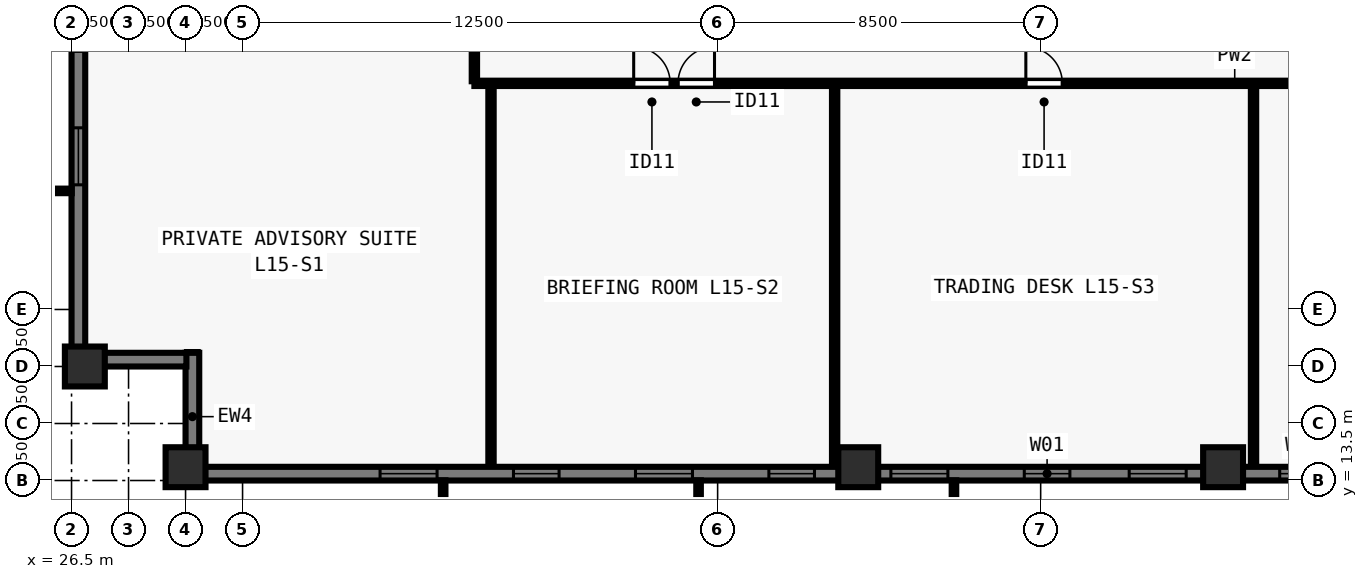
"""IFC4 building model, lengths in metres.
Left out: names, types, materials, properties, quantities, classifications, styles, units other than length and angle.
Written with IfcOpenShell. Run it as: python <this file> out.ifc"""

import sys

from ifc_helpers import new_model, si_unit, direction, frame, frame_2d, origin, origin_2d, place, context, subcontext, project, spatial, rectangle, extrude, element, fill, save


model = new_model("IFC4")
c1 = context("Model", 3, precision=1e-05, world=origin(), true_north=direction((0.0, 1.0)))
c2 = subcontext(c1, "Body", "Model", "MODEL_VIEW")
j1 = project(units=[si_unit("LENGTHUNIT", "METRE"), si_unit("PLANEANGLEUNIT", "RADIAN")], contexts=[c1])
p1 = place(None, origin())
s1 = spatial("IfcSite", under=j1, at=p1, CompositionType="ELEMENT")
p2 = place(p1, origin())
s2 = spatial("IfcBuilding", under=s1, at=p2, CompositionType="ELEMENT")
p3 = place(p2, frame((0.0, 0.0, 58.5)))
s3 = spatial("IfcBuildingStorey", under=s2, at=p3, CompositionType="ELEMENT", Elevation=58.5)
for number, where, z_axis, x_axis in (
    (1, (29.5, 13.85, 0.0), (0.0, 0.0, 1.0), (1.0, 0.0, 0.0)),
    (2, (47.2, 13.85, 0.0), (0.0, 0.0, 1.0), (1.0, 0.0, 0.0)),
    (3, (56.8, 13.85, 0.0), (0.0, 0.0, 1.0), (1.0, 0.0, 0.0)),
    (4, (26.85, 16.5, 0.0), (0.0, 0.0, 1.0), (0.0, 1.0, 0.0)),
):
    element("IfcColumn", number, at=place(p3, frame(where, z_axis=z_axis, x_axis=x_axis)), inside=s3, PredefinedType="COLUMN", context=c2, shape_type="SweptSolid", body=[
        extrude(rectangle(XDim=1.05, YDim=1.05, at=origin_2d()), origin(), (0.0, 0.0, 1.0), 3.5),
    ])
p4 = place(p3, frame((74.5, 13.68, 0.0), z_axis=(0.0, 0.0, 1.0), x_axis=(-1.0, 0.0, 0.0)))
e5 = element("IfcWall", 5, at=p4, inside=s3, PredefinedType="SOLIDWALL", context=c2, shape_type="SweptSolid", body=[
    extrude(rectangle(XDim=44.662, YDim=0.36, at=frame_2d((22.331, 0.0))), origin(), (0.0, 0.0, 1.0), 3.28),
])
p5 = place(p4, frame((4.78, 0.0, 0.8)))
e6 = element("IfcOpeningElement", 6, at=p5, cuts=e5, PredefinedType="OPENING", context=c2, shape_type="SweptSolid", body=[
    extrude(rectangle(XDim=1.5, YDim=1.544, at=frame_2d((0.75, 0.772))), frame((0.0, 0.19, 0.0), z_axis=(0.0, -1.0, 0.0), x_axis=(1.0, 0.0, 0.0)), (0.0, 0.0, 1.0), 0.38),
])
p6 = place(p4, frame((8.29, 0.0, 0.8)))
e7 = element("IfcOpeningElement", 7, at=p6, cuts=e5, PredefinedType="OPENING", context=c2, shape_type="SweptSolid", body=[
    extrude(rectangle(XDim=1.2, YDim=1.544, at=frame_2d((0.6, 0.772))), frame((0.0, 0.19, 0.0), z_axis=(0.0, -1.0, 0.0), x_axis=(1.0, 0.0, 0.0)), (0.0, 0.0, 1.0), 0.38),
])
p7 = place(p4, frame((11.5, 0.0, 0.8)))
e8 = element("IfcOpeningElement", 8, at=p7, cuts=e5, PredefinedType="OPENING", context=c2, shape_type="SweptSolid", body=[
    extrude(rectangle(XDim=1.5, YDim=1.544, at=frame_2d((0.75, 0.772))), frame((0.0, 0.19, 0.0), z_axis=(0.0, -1.0, 0.0), x_axis=(1.0, 0.0, 0.0)), (0.0, 0.0, 1.0), 0.38),
])
p8 = place(p4, frame((15.01, 0.0, 0.8)))
e9 = element("IfcOpeningElement", 9, at=p8, cuts=e5, PredefinedType="OPENING", context=c2, shape_type="SweptSolid", body=[
    extrude(rectangle(XDim=1.2, YDim=1.544, at=frame_2d((0.6, 0.772))), frame((0.0, 0.19, 0.0), z_axis=(0.0, -1.0, 0.0), x_axis=(1.0, 0.0, 0.0)), (0.0, 0.0, 1.0), 0.38),
])
p9 = place(p4, frame((18.671, 0.0, 0.8)))
e10 = element("IfcOpeningElement", 10, at=p9, cuts=e5, PredefinedType="OPENING", context=c2, shape_type="SweptSolid", body=[
    extrude(rectangle(XDim=1.5, YDim=1.544, at=frame_2d((0.75, 0.772))), frame((0.0, 0.19, 0.0), z_axis=(0.0, -1.0, 0.0), x_axis=(1.0, 0.0, 0.0)), (0.0, 0.0, 1.0), 0.38),
])
p10 = place(p4, frame((21.731, 0.0, 0.8)))
e11 = element("IfcOpeningElement", 11, at=p10, cuts=e5, PredefinedType="OPENING", context=c2, shape_type="SweptSolid", body=[
    extrude(rectangle(XDim=1.2, YDim=1.544, at=frame_2d((0.6, 0.772))), frame((0.0, 0.19, 0.0), z_axis=(0.0, -1.0, 0.0), x_axis=(1.0, 0.0, 0.0)), (0.0, 0.0, 1.0), 0.38),
])
p11 = place(p4, frame((24.941, 0.0, 0.8)))
e12 = element("IfcOpeningElement", 12, at=p11, cuts=e5, PredefinedType="OPENING", context=c2, shape_type="SweptSolid", body=[
    extrude(rectangle(XDim=1.5, YDim=1.544, at=frame_2d((0.75, 0.772))), frame((0.0, 0.19, 0.0), z_axis=(0.0, -1.0, 0.0), x_axis=(1.0, 0.0, 0.0)), (0.0, 0.0, 1.0), 0.38),
])
p12 = place(p4, frame((28.451, 0.0, 0.8)))
e13 = element("IfcOpeningElement", 13, at=p12, cuts=e5, PredefinedType="OPENING", context=c2, shape_type="SweptSolid", body=[
    extrude(rectangle(XDim=1.2, YDim=1.544, at=frame_2d((0.6, 0.772))), frame((0.0, 0.19, 0.0), z_axis=(0.0, -1.0, 0.0), x_axis=(1.0, 0.0, 0.0)), (0.0, 0.0, 1.0), 0.38),
])
p13 = place(p4, frame((31.662, 0.0, 0.8)))
e14 = element("IfcOpeningElement", 14, at=p13, cuts=e5, PredefinedType="OPENING", context=c2, shape_type="SweptSolid", body=[
    extrude(rectangle(XDim=1.5, YDim=1.544, at=frame_2d((0.75, 0.772))), frame((0.0, 0.19, 0.0), z_axis=(0.0, -1.0, 0.0), x_axis=(1.0, 0.0, 0.0)), (0.0, 0.0, 1.0), 0.38),
])
p14 = place(p4, frame((35.172, 0.0, 0.8)))
e15 = element("IfcOpeningElement", 15, at=p14, cuts=e5, PredefinedType="OPENING", context=c2, shape_type="SweptSolid", body=[
    extrude(rectangle(XDim=1.2, YDim=1.544, at=frame_2d((0.6, 0.772))), frame((0.0, 0.19, 0.0), z_axis=(0.0, -1.0, 0.0), x_axis=(1.0, 0.0, 0.0)), (0.0, 0.0, 1.0), 0.38),
])
p15 = place(p4, frame((38.382, 0.0, 0.8)))
e16 = element("IfcOpeningElement", 16, at=p15, cuts=e5, PredefinedType="OPENING", context=c2, shape_type="SweptSolid", body=[
    extrude(rectangle(XDim=1.5, YDim=1.544, at=frame_2d((0.75, 0.772))), frame((0.0, 0.19, 0.0), z_axis=(0.0, -1.0, 0.0), x_axis=(1.0, 0.0, 0.0)), (0.0, 0.0, 1.0), 0.38),
])
p16 = place(p3, frame((29.68, 13.5, 0.0), z_axis=(0.0, 0.0, 1.0), x_axis=(0.0, 1.0, 0.0)))
e17 = element("IfcWall", 17, at=p16, inside=s3, PredefinedType="SOLIDWALL", context=c2, shape_type="SweptSolid", body=[
    extrude(rectangle(XDim=3.36, YDim=0.36, at=frame_2d((1.68, 0.0))), origin(), (0.0, 0.0, 1.0), 3.28),
])
p17 = place(p3, frame((29.522, 16.68, 0.0), z_axis=(0.0, 0.0, 1.0), x_axis=(-1.0, 0.0, 0.0)))
e18 = element("IfcWall", 18, at=p17, inside=s3, PredefinedType="SOLIDWALL", context=c2, shape_type="SweptSolid", body=[
    extrude(rectangle(XDim=2.684, YDim=0.36, at=frame_2d((1.342, 0.0))), origin(), (0.0, 0.0, 1.0), 3.28),
])
p18 = place(p3, frame((26.68, 16.5, 0.0), z_axis=(0.0, 0.0, 1.0), x_axis=(0.0, 1.0, 0.0)))
e19 = element("IfcWall", 19, at=p18, inside=s3, PredefinedType="SOLIDWALL", context=c2, shape_type="SweptSolid", body=[
    extrude(rectangle(XDim=44.662, YDim=0.36, at=frame_2d((22.331, 0.0))), origin(), (0.0, 0.0, 1.0), 3.28),
])
p19 = place(p18, frame((4.78, 0.0, 0.8)))
e20 = element("IfcOpeningElement", 20, at=p19, cuts=e19, PredefinedType="OPENING", context=c2, shape_type="SweptSolid", body=[
    extrude(rectangle(XDim=1.5, YDim=1.544, at=frame_2d((0.75, 0.772))), frame((0.0, 0.19, 0.0), z_axis=(0.0, -1.0, 0.0), x_axis=(1.0, 0.0, 0.0)), (0.0, 0.0, 1.0), 0.38),
])
p20 = place(p18, frame((8.29, 0.0, 0.8)))
e21 = element("IfcOpeningElement", 21, at=p20, cuts=e19, PredefinedType="OPENING", context=c2, shape_type="SweptSolid", body=[
    extrude(rectangle(XDim=1.2, YDim=1.544, at=frame_2d((0.6, 0.772))), frame((0.0, 0.19, 0.0), z_axis=(0.0, -1.0, 0.0), x_axis=(1.0, 0.0, 0.0)), (0.0, 0.0, 1.0), 0.38),
])
p21 = place(p18, frame((11.5, 0.0, 0.8)))
e22 = element("IfcOpeningElement", 22, at=p21, cuts=e19, PredefinedType="OPENING", context=c2, shape_type="SweptSolid", body=[
    extrude(rectangle(XDim=1.5, YDim=1.544, at=frame_2d((0.75, 0.772))), frame((0.0, 0.19, 0.0), z_axis=(0.0, -1.0, 0.0), x_axis=(1.0, 0.0, 0.0)), (0.0, 0.0, 1.0), 0.38),
])
p22 = place(p18, frame((15.01, 0.0, 0.8)))
e23 = element("IfcOpeningElement", 23, at=p22, cuts=e19, PredefinedType="OPENING", context=c2, shape_type="SweptSolid", body=[
    extrude(rectangle(XDim=1.2, YDim=1.544, at=frame_2d((0.6, 0.772))), frame((0.0, 0.19, 0.0), z_axis=(0.0, -1.0, 0.0), x_axis=(1.0, 0.0, 0.0)), (0.0, 0.0, 1.0), 0.38),
])
p23 = place(p18, frame((21.731, 0.0, 0.8)))
e24 = element("IfcOpeningElement", 24, at=p23, cuts=e19, PredefinedType="OPENING", context=c2, shape_type="SweptSolid", body=[
    extrude(rectangle(XDim=1.2, YDim=1.544, at=frame_2d((0.6, 0.772))), frame((0.0, 0.19, 0.0), z_axis=(0.0, -1.0, 0.0), x_axis=(1.0, 0.0, 0.0)), (0.0, 0.0, 1.0), 0.38),
])
p24 = place(p18, frame((24.091, 0.0, 0.8)))
e25 = element("IfcOpeningElement", 25, at=p24, cuts=e19, PredefinedType="OPENING", context=c2, shape_type="SweptSolid", body=[
    extrude(rectangle(XDim=1.5, YDim=1.544, at=frame_2d((0.75, 0.772))), frame((0.0, 0.19, 0.0), z_axis=(0.0, -1.0, 0.0), x_axis=(1.0, 0.0, 0.0)), (0.0, 0.0, 1.0), 0.38),
])
p25 = place(p18, frame((28.451, 0.0, 0.8)))
e26 = element("IfcOpeningElement", 26, at=p25, cuts=e19, PredefinedType="OPENING", context=c2, shape_type="SweptSolid", body=[
    extrude(rectangle(XDim=1.2, YDim=1.544, at=frame_2d((0.6, 0.772))), frame((0.0, 0.19, 0.0), z_axis=(0.0, -1.0, 0.0), x_axis=(1.0, 0.0, 0.0)), (0.0, 0.0, 1.0), 0.38),
])
p26 = place(p18, frame((31.662, 0.0, 0.8)))
e27 = element("IfcOpeningElement", 27, at=p26, cuts=e19, PredefinedType="OPENING", context=c2, shape_type="SweptSolid", body=[
    extrude(rectangle(XDim=1.5, YDim=1.544, at=frame_2d((0.75, 0.772))), frame((0.0, 0.19, 0.0), z_axis=(0.0, -1.0, 0.0), x_axis=(1.0, 0.0, 0.0)), (0.0, 0.0, 1.0), 0.38),
])
p27 = place(p18, frame((35.172, 0.0, 0.8)))
e28 = element("IfcOpeningElement", 28, at=p27, cuts=e19, PredefinedType="OPENING", context=c2, shape_type="SweptSolid", body=[
    extrude(rectangle(XDim=1.2, YDim=1.544, at=frame_2d((0.6, 0.772))), frame((0.0, 0.19, 0.0), z_axis=(0.0, -1.0, 0.0), x_axis=(1.0, 0.0, 0.0)), (0.0, 0.0, 1.0), 0.38),
])
p28 = place(p18, frame((38.382, 0.0, 0.8)))
e29 = element("IfcOpeningElement", 29, at=p28, cuts=e19, PredefinedType="OPENING", context=c2, shape_type="SweptSolid", body=[
    extrude(rectangle(XDim=1.5, YDim=1.544, at=frame_2d((0.75, 0.772))), frame((0.0, 0.19, 0.0), z_axis=(0.0, -1.0, 0.0), x_axis=(1.0, 0.0, 0.0)), (0.0, 0.0, 1.0), 0.38),
])
p29 = place(p3, frame((37.1, 23.95, 0.0), z_axis=(0.0, 0.0, 1.0), x_axis=(1.0, 0.0, 0.0)))
e30 = element("IfcWall", 30, at=p29, inside=s3, PredefinedType="PARTITIONING", context=c2, shape_type="SweptSolid", body=[
    extrude(rectangle(XDim=29.8, YDim=0.14, at=frame_2d((14.9, 0.0))), origin(), (0.0, 0.0, 1.0), 3.28),
])
p30 = place(p29, frame((4.191, 0.0, 0.0)))
e31 = element("IfcOpeningElement", 31, at=p30, cuts=e30, PredefinedType="OPENING", context=c2, shape_type="SweptSolid", body=[
    extrude(rectangle(XDim=0.96, YDim=2.12, at=frame_2d((0.48, 1.06))), frame((0.0, 0.08, 0.0), z_axis=(0.0, -1.0, 0.0), x_axis=(1.0, 0.0, 0.0)), (0.0, 0.0, 1.0), 0.16),
])
p31 = place(p29, frame((5.358, 0.0, 0.0)))
e32 = element("IfcOpeningElement", 32, at=p31, cuts=e30, PredefinedType="OPENING", context=c2, shape_type="SweptSolid", body=[
    extrude(rectangle(XDim=0.96, YDim=2.12, at=frame_2d((0.48, 1.06))), frame((0.0, 0.08, 0.0), z_axis=(0.0, -1.0, 0.0), x_axis=(1.0, 0.0, 0.0)), (0.0, 0.0, 1.0), 0.16),
])
p32 = place(p29, frame((14.51, 0.0, 0.0)))
e33 = element("IfcOpeningElement", 33, at=p32, cuts=e30, PredefinedType="OPENING", context=c2, shape_type="SweptSolid", body=[
    extrude(rectangle(XDim=0.96, YDim=2.12, at=frame_2d((0.48, 1.06))), frame((0.0, 0.08, 0.0), z_axis=(0.0, -1.0, 0.0), x_axis=(1.0, 0.0, 0.0)), (0.0, 0.0, 1.0), 0.16),
])
p33 = place(p29, frame((24.542, 0.0, 0.0)))
e34 = element("IfcOpeningElement", 34, at=p33, cuts=e30, PredefinedType="OPENING", context=c2, shape_type="SweptSolid", body=[
    extrude(rectangle(XDim=0.96, YDim=2.12, at=frame_2d((0.48, 1.06))), frame((0.0, 0.08, 0.0), z_axis=(0.0, -1.0, 0.0), x_axis=(1.0, 0.0, 0.0)), (0.0, 0.0, 1.0), 0.16),
])
p34 = place(p29, frame((28.26, 0.0, 0.0)))
e35 = element("IfcOpeningElement", 35, at=p34, cuts=e30, PredefinedType="OPENING", context=c2, shape_type="SweptSolid", body=[
    extrude(rectangle(XDim=0.96, YDim=2.12, at=frame_2d((0.48, 1.06))), frame((0.0, 0.08, 0.0), z_axis=(0.0, -1.0, 0.0), x_axis=(1.0, 0.0, 0.0)), (0.0, 0.0, 1.0), 0.16),
])
p35 = place(p3, frame((37.1, 24.005, 0.0), z_axis=(0.0, 0.0, 1.0), x_axis=(0.0, 1.0, 0.0)))
e36 = element("IfcWall", 36, at=p35, inside=s3, PredefinedType="PARTITIONING", context=c2, shape_type="SweptSolid", body=[
    extrude(rectangle(XDim=29.99, YDim=0.14, at=frame_2d((14.995, 0.0))), origin(), (0.0, 0.0, 1.0), 3.28),
])
p36 = place(p35, frame((2.76, 0.0, 0.0)))
e37 = element("IfcOpeningElement", 37, at=p36, cuts=e36, PredefinedType="OPENING", context=c2, shape_type="SweptSolid", body=[
    extrude(rectangle(XDim=0.96, YDim=2.12, at=frame_2d((0.48, 1.06))), frame((0.0, 0.08, 0.0), z_axis=(0.0, -1.0, 0.0), x_axis=(1.0, 0.0, 0.0)), (0.0, 0.0, 1.0), 0.16),
])
p37 = place(p35, frame((8.598, 0.0, 0.0)))
e38 = element("IfcOpeningElement", 38, at=p37, cuts=e36, PredefinedType="OPENING", context=c2, shape_type="SweptSolid", body=[
    extrude(rectangle(XDim=0.96, YDim=2.12, at=frame_2d((0.48, 1.06))), frame((0.0, 0.08, 0.0), z_axis=(0.0, -1.0, 0.0), x_axis=(1.0, 0.0, 0.0)), (0.0, 0.0, 1.0), 0.16),
])
p38 = place(p35, frame((14.578, 0.0, 0.0)))
e39 = element("IfcOpeningElement", 39, at=p38, cuts=e36, PredefinedType="OPENING", context=c2, shape_type="SweptSolid", body=[
    extrude(rectangle(XDim=0.96, YDim=2.12, at=frame_2d((0.48, 1.06))), frame((0.0, 0.08, 0.0), z_axis=(0.0, -1.0, 0.0), x_axis=(1.0, 0.0, 0.0)), (0.0, 0.0, 1.0), 0.16),
])
p39 = place(p35, frame((20.558, 0.0, 0.0)))
e40 = element("IfcOpeningElement", 40, at=p39, cuts=e36, PredefinedType="OPENING", context=c2, shape_type="SweptSolid", body=[
    extrude(rectangle(XDim=0.96, YDim=2.12, at=frame_2d((0.48, 1.06))), frame((0.0, 0.08, 0.0), z_axis=(0.0, -1.0, 0.0), x_axis=(1.0, 0.0, 0.0)), (0.0, 0.0, 1.0), 0.16),
])
p40 = place(p35, frame((26.333, 0.0, 0.0)))
e41 = element("IfcOpeningElement", 41, at=p40, cuts=e36, PredefinedType="OPENING", context=c2, shape_type="SweptSolid", body=[
    extrude(rectangle(XDim=0.96, YDim=2.12, at=frame_2d((0.48, 1.06))), frame((0.0, 0.08, 0.0), z_axis=(0.0, -1.0, 0.0), x_axis=(1.0, 0.0, 0.0)), (0.0, 0.0, 1.0), 0.16),
])
p41 = place(p3, frame((37.537, 13.92, 0.0), z_axis=(0.0, 0.0, 1.0), x_axis=(0.0, 1.0, 0.0)))
e42 = element("IfcWall", 42, at=p41, inside=s3, PredefinedType="PARTITIONING", context=c2, shape_type="SweptSolid", body=[
    extrude(rectangle(XDim=9.93, YDim=0.14, at=frame_2d((4.965, 0.0))), origin(), (0.0, 0.0, 1.0), 2.439),
])
for number, where, z_axis, x_axis in (
    (43, (46.579, 13.92, 0.0), (0.0, 0.0, 1.0), (0.0, 1.0, 0.0)),
    (44, (57.601, 13.92, 0.0), (0.0, 0.0, 1.0), (0.0, 1.0, 0.0)),
):
    element("IfcWall", number, at=place(p3, frame(where, z_axis=z_axis, x_axis=x_axis)), inside=s3, PredefinedType="PARTITIONING", context=c2, shape_type="SweptSolid", body=[
        extrude(rectangle(XDim=9.93, YDim=0.14, at=frame_2d((4.965, 0.0))), origin(), (0.0, 0.0, 1.0), 3.28),
    ])
p42 = place(p8, origin())
e45 = element("IfcWindow", 45, at=p42, inside=s3, PartitioningType="SINGLE_PANEL", PredefinedType="WINDOW", context=c2, shape_type="SweptSolid", body=[
    extrude(rectangle(XDim=1.2, YDim=1.544, at=frame_2d((0.6, 0.772))), frame((0.0, -0.05, 0.0), z_axis=(0.0, -1.0, 0.0), x_axis=(1.0, 0.0, 0.0)), (0.0, 0.0, 1.0), 0.06),
])
fill(e9, e45)
p43 = place(p9, origin())
e46 = element("IfcWindow", 46, at=p43, inside=s3, PartitioningType="SINGLE_PANEL", PredefinedType="WINDOW", context=c2, shape_type="SweptSolid", body=[
    extrude(rectangle(XDim=1.5, YDim=1.544, at=frame_2d((0.75, 0.772))), frame((0.0, -0.05, 0.0), z_axis=(0.0, -1.0, 0.0), x_axis=(1.0, 0.0, 0.0)), (0.0, 0.0, 1.0), 0.06),
])
fill(e10, e46)
p44 = place(p10, origin())
e47 = element("IfcWindow", 47, at=p44, inside=s3, PartitioningType="SINGLE_PANEL", PredefinedType="WINDOW", context=c2, shape_type="SweptSolid", body=[
    extrude(rectangle(XDim=1.2, YDim=1.544, at=frame_2d((0.6, 0.772))), frame((0.0, -0.05, 0.0), z_axis=(0.0, -1.0, 0.0), x_axis=(1.0, 0.0, 0.0)), (0.0, 0.0, 1.0), 0.06),
])
fill(e11, e47)
p45 = place(p11, origin())
e48 = element("IfcWindow", 48, at=p45, inside=s3, PartitioningType="SINGLE_PANEL", PredefinedType="WINDOW", context=c2, shape_type="SweptSolid", body=[
    extrude(rectangle(XDim=1.5, YDim=1.544, at=frame_2d((0.75, 0.772))), frame((0.0, -0.05, 0.0), z_axis=(0.0, -1.0, 0.0), x_axis=(1.0, 0.0, 0.0)), (0.0, 0.0, 1.0), 0.06),
])
fill(e12, e48)
p46 = place(p12, origin())
e49 = element("IfcWindow", 49, at=p46, inside=s3, PartitioningType="SINGLE_PANEL", PredefinedType="WINDOW", context=c2, shape_type="SweptSolid", body=[
    extrude(rectangle(XDim=1.2, YDim=1.544, at=frame_2d((0.6, 0.772))), frame((0.0, -0.05, 0.0), z_axis=(0.0, -1.0, 0.0), x_axis=(1.0, 0.0, 0.0)), (0.0, 0.0, 1.0), 0.06),
])
fill(e13, e49)
p47 = place(p13, origin())
e50 = element("IfcWindow", 50, at=p47, inside=s3, PartitioningType="SINGLE_PANEL", PredefinedType="WINDOW", context=c2, shape_type="SweptSolid", body=[
    extrude(rectangle(XDim=1.5, YDim=1.544, at=frame_2d((0.75, 0.772))), frame((0.0, -0.05, 0.0), z_axis=(0.0, -1.0, 0.0), x_axis=(1.0, 0.0, 0.0)), (0.0, 0.0, 1.0), 0.06),
])
fill(e14, e50)
p48 = place(p14, origin())
e51 = element("IfcWindow", 51, at=p48, inside=s3, PartitioningType="SINGLE_PANEL", PredefinedType="WINDOW", context=c2, shape_type="SweptSolid", body=[
    extrude(rectangle(XDim=1.2, YDim=1.544, at=frame_2d((0.6, 0.772))), frame((0.0, -0.05, 0.0), z_axis=(0.0, -1.0, 0.0), x_axis=(1.0, 0.0, 0.0)), (0.0, 0.0, 1.0), 0.06),
])
fill(e15, e51)
p49 = place(p15, origin())
e52 = element("IfcWindow", 52, at=p49, inside=s3, PartitioningType="SINGLE_PANEL", PredefinedType="WINDOW", context=c2, shape_type="SweptSolid", body=[
    extrude(rectangle(XDim=1.5, YDim=1.544, at=frame_2d((0.75, 0.772))), frame((0.0, -0.05, 0.0), z_axis=(0.0, -1.0, 0.0), x_axis=(1.0, 0.0, 0.0)), (0.0, 0.0, 1.0), 0.06),
])
fill(e16, e52)
p50 = place(p19, origin())
e53 = element("IfcWindow", 53, at=p50, inside=s3, PartitioningType="SINGLE_PANEL", PredefinedType="WINDOW", context=c2, shape_type="SweptSolid", body=[
    extrude(rectangle(XDim=1.5, YDim=1.544, at=frame_2d((0.75, 0.772))), frame((0.0, -0.05, 0.0), z_axis=(0.0, -1.0, 0.0), x_axis=(1.0, 0.0, 0.0)), (0.0, 0.0, 1.0), 0.06),
])
fill(e20, e53)
p51 = place(p30, origin())
e54 = element("IfcDoor", 54, at=p51, inside=s3, OperationType="SINGLE_SWING_LEFT", PredefinedType="DOOR", context=c2, shape_type="SweptSolid", body=[
    extrude(rectangle(XDim=0.96, YDim=2.12, at=frame_2d((0.48, 1.06))), frame((0.0, 0.025, 0.0), z_axis=(0.0, -1.0, 0.0), x_axis=(1.0, 0.0, 0.0)), (0.0, 0.0, 1.0), 0.05),
])
fill(e31, e54)
p52 = place(p31, origin())
e55 = element("IfcDoor", 55, at=p52, inside=s3, OperationType="SINGLE_SWING_RIGHT", PredefinedType="DOOR", context=c2, shape_type="SweptSolid", body=[
    extrude(rectangle(XDim=0.96, YDim=2.12, at=frame_2d((0.48, 1.06))), frame((0.0, 0.025, 0.0), z_axis=(0.0, -1.0, 0.0), x_axis=(1.0, 0.0, 0.0)), (0.0, 0.0, 1.0), 0.05),
])
fill(e32, e55)
p53 = place(p32, origin())
e56 = element("IfcDoor", 56, at=p53, inside=s3, OperationType="SINGLE_SWING_LEFT", PredefinedType="DOOR", context=c2, shape_type="SweptSolid", body=[
    extrude(rectangle(XDim=0.96, YDim=2.12, at=frame_2d((0.48, 1.06))), frame((0.0, 0.025, 0.0), z_axis=(0.0, -1.0, 0.0), x_axis=(1.0, 0.0, 0.0)), (0.0, 0.0, 1.0), 0.05),
])
fill(e33, e56)
save(model, sys.argv[1])
